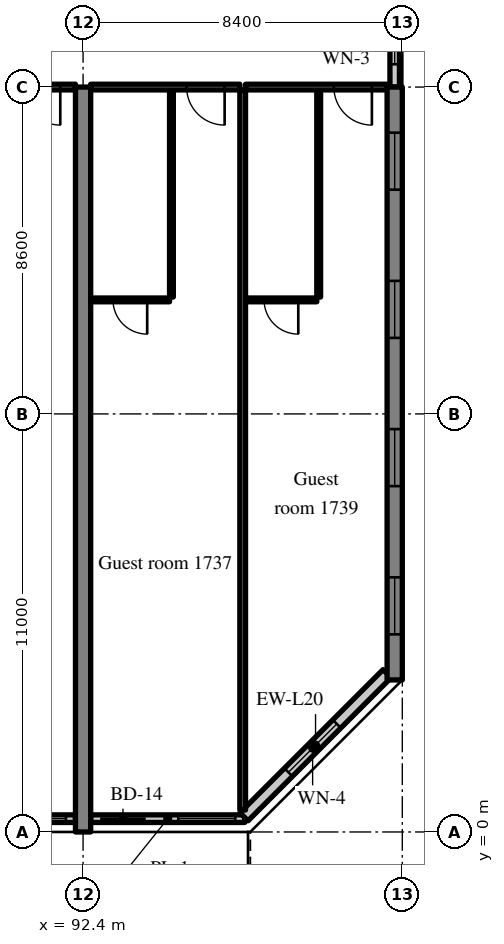
"""IFC4 building model, lengths in metres.
Left out: names, types, materials, properties, quantities, classifications, styles, units other than length and angle.
Written with IfcOpenShell. Run it as: python <this file> out.ifc"""

import sys

from ifc_helpers import new_model, si_unit, direction, frame, frame_2d, origin, place, context, subcontext, project, spatial, rectangle, extrude, source, transform, mapped, element, fill, save


model = new_model("IFC4")
c1 = context("Model", 3, precision=1e-05, world=origin(), true_north=direction((0.0, 1.0)))
c2 = subcontext(c1, "Body", "Model", "MODEL_VIEW")
j1 = project(units=[si_unit("LENGTHUNIT", "METRE"), si_unit("PLANEANGLEUNIT", "RADIAN")], contexts=[c1])
p1 = place(None, origin())
s1 = spatial("IfcSite", under=j1, at=p1, CompositionType="ELEMENT")
p2 = place(p1, origin())
s2 = spatial("IfcBuilding", under=s1, at=p2, CompositionType="ELEMENT")
p3 = place(p2, frame((0.0, 0.0, 73.4)))
s3 = spatial("IfcBuildingStorey", under=s2, at=p3, CompositionType="ELEMENT", Elevation=73.4)
m1 = source(origin(), c2, "Body", "SweptSolid", [
    extrude(rectangle(XDim=19.6, YDim=0.4, at=frame_2d((9.8, 0.0))), origin(), (0.0, 0.0, 1.0), 3.52),
])
p4 = place(p3, frame((92.4, 0.0, 0.0), z_axis=(0.0, 0.0, 1.0), x_axis=(0.0, 1.0, 0.0)))
e1 = element("IfcWall", 1, at=p4, inside=s3, PredefinedType="SHEAR", context=c2, shape_type="MappedRepresentation", body=[
    mapped(m1, transform((0.0, 0.0, 0.0), scale=1.0)),
])
m2 = source(origin(), c2, "Body", "SweptSolid", [
    extrude(rectangle(XDim=15.6, YDim=0.4, at=frame_2d((7.8, 0.0))), origin(), (0.0, 0.0, 1.0), 3.52),
])
p5 = place(p3, frame((100.6, 4.0, 0.0), z_axis=(0.0, 0.0, 1.0), x_axis=(0.0, 1.0, 0.0)))
e2 = element("IfcWall", 2, at=p5, inside=s3, PredefinedType="SHEAR", context=c2, shape_type="MappedRepresentation", body=[
    mapped(m2, transform((0.0, 0.0, 0.0), scale=1.0)),
])
m3 = source(origin(), c2, "Body", "SweptSolid", [
    extrude(rectangle(XDim=1.5, YDim=1.5, at=frame_2d((0.75, 0.75))), frame((0.0, 0.21, 0.0), z_axis=(0.0, -1.0, 0.0), x_axis=(1.0, 0.0, 0.0)), (0.0, 0.0, 1.0), 0.42),
])
p6 = place(p5, frame((1.2, 0.0, 0.9)))
e3 = element("IfcOpeningElement", 3, at=p6, cuts=e2, PredefinedType="OPENING", context=c2, shape_type="MappedRepresentation", body=[
    mapped(m3, transform((0.0, 0.0, 0.0), scale=1.0)),
])
p7 = place(p5, frame((5.1, 0.0, 0.9)))
e4 = element("IfcOpeningElement", 4, at=p7, cuts=e2, PredefinedType="OPENING", context=c2, shape_type="MappedRepresentation", body=[
    mapped(m3, transform((0.0, 0.0, 0.0), scale=1.0)),
])
p8 = place(p5, frame((9.0, 0.0, 0.9)))
e5 = element("IfcOpeningElement", 5, at=p8, cuts=e2, PredefinedType="OPENING", context=c2, shape_type="MappedRepresentation", body=[
    mapped(m3, transform((0.0, 0.0, 0.0), scale=1.0)),
])
p9 = place(p5, frame((12.9, 0.0, 0.9)))
e6 = element("IfcOpeningElement", 6, at=p9, cuts=e2, PredefinedType="OPENING", context=c2, shape_type="MappedRepresentation", body=[
    mapped(m3, transform((0.0, 0.0, 0.0), scale=1.0)),
])
m4 = source(origin(), c2, "Body", "SweptSolid", [
    extrude(rectangle(XDim=3.6, YDim=0.2, at=frame_2d((1.8, 0.0))), origin(), (0.0, 0.0, 1.0), 2.82),
])
p10 = place(p3, frame((88.6, 0.35, 0.0), z_axis=(0.0, 0.0, 1.0), x_axis=(1.0, 0.0, 0.0)))
e7 = element("IfcWall", 7, at=p10, inside=s3, PredefinedType="SOLIDWALL", context=c2, shape_type="MappedRepresentation", body=[
    mapped(m4, transform((0.0, 0.0, 0.0), scale=1.0)),
])
m5 = source(origin(), c2, "Body", "SweptSolid", [
    extrude(rectangle(XDim=1.2, YDim=2.4, at=frame_2d((0.6, 1.2))), frame((0.0, 0.11, 0.0), z_axis=(0.0, -1.0, 0.0), x_axis=(1.0, 0.0, 0.0)), (0.0, 0.0, 1.0), 0.22),
])
p11 = place(p10, frame((0.25, 0.0, 0.0)))
e8 = element("IfcOpeningElement", 8, at=p11, cuts=e7, PredefinedType="OPENING", context=c2, shape_type="MappedRepresentation", body=[
    mapped(m5, transform((0.0, 0.0, 0.0), scale=1.0)),
])
m6 = source(origin(), c2, "Body", "SweptSolid", [
    extrude(rectangle(XDim=1.5, YDim=1.5, at=frame_2d((0.75, 0.75))), frame((0.0, 0.11, 0.0), z_axis=(0.0, -1.0, 0.0), x_axis=(1.0, 0.0, 0.0)), (0.0, 0.0, 1.0), 0.22),
])
p12 = place(p10, frame((1.85, 0.0, 0.9)))
e9 = element("IfcOpeningElement", 9, at=p12, cuts=e7, PredefinedType="OPENING", context=c2, shape_type="MappedRepresentation", body=[
    mapped(m6, transform((0.0, 0.0, 0.0), scale=1.0)),
])
m7 = source(origin(), c2, "Body", "SweptSolid", [
    extrude(rectangle(XDim=4.055, YDim=0.2, at=frame_2d((2.027, 0.0))), origin(), (0.0, 0.0, 1.0), 2.82),
])
p13 = place(p3, frame((92.6, 0.35, 0.0), z_axis=(0.0, 0.0, 1.0), x_axis=(1.0, 0.0, 0.0)))
e10 = element("IfcWall", 10, at=p13, inside=s3, PredefinedType="SOLIDWALL", context=c2, shape_type="MappedRepresentation", body=[
    mapped(m7, transform((0.0, 0.0, 0.0), scale=1.0)),
])
p14 = place(p13, frame((0.25, 0.0, 0.0)))
e11 = element("IfcOpeningElement", 11, at=p14, cuts=e10, PredefinedType="OPENING", context=c2, shape_type="MappedRepresentation", body=[
    mapped(m5, transform((0.0, 0.0, 0.0), scale=1.0)),
])
p15 = place(p13, frame((2.305, 0.0, 0.9)))
e12 = element("IfcOpeningElement", 12, at=p15, cuts=e10, PredefinedType="OPENING", context=c2, shape_type="MappedRepresentation", body=[
    mapped(m6, transform((0.0, 0.0, 0.0), scale=1.0)),
])
m8 = source(origin(), c2, "Body", "SweptSolid", [
    extrude(rectangle(XDim=5.326, YDim=0.3, at=frame_2d((2.663, 0.0))), origin(), (0.0, 0.0, 1.0), 3.52),
])
p16 = place(p3, frame((96.634, 0.4, 0.0), z_axis=(0.0, 0.0, 1.0), x_axis=(0.707083859269, 0.707129702361, 0.0)))
e13 = element("IfcWall", 13, at=p16, inside=s3, PredefinedType="SOLIDWALL", context=c2, shape_type="MappedRepresentation", body=[
    mapped(m8, transform((0.0, 0.0, 0.0), scale=1.0)),
])
m9 = source(origin(), c2, "Body", "SweptSolid", [
    extrude(rectangle(XDim=1.8, YDim=1.5, at=frame_2d((0.9, 0.75))), frame((0.0, 0.16, 0.0), z_axis=(0.0, -1.0, 0.0), x_axis=(1.0, 0.0, 0.0)), (0.0, 0.0, 1.0), 0.32),
])
p17 = place(p16, frame((1.654, 0.0, 0.9)))
e14 = element("IfcOpeningElement", 14, at=p17, cuts=e13, PredefinedType="OPENING", context=c2, shape_type="MappedRepresentation", body=[
    mapped(m9, transform((0.0, 0.0, 0.0), scale=1.0)),
])
m10 = source(origin(), c2, "Body", "SweptSolid", [
    extrude(rectangle(XDim=2.4, YDim=0.25, at=frame_2d((1.2, 0.0))), origin(), (0.0, 0.0, 1.0), 2.62),
])
p18 = place(p3, frame((100.6, 19.6, 0.0), z_axis=(0.0, 0.0, 1.0), x_axis=(0.0, 1.0, 0.0)))
e15 = element("IfcWall", 15, at=p18, inside=s3, PredefinedType="SOLIDWALL", context=c2, shape_type="MappedRepresentation", body=[
    mapped(m10, transform((0.0, 0.0, 0.0), scale=1.0)),
])
m11 = source(origin(), c2, "Body", "SweptSolid", [
    extrude(rectangle(XDim=1.2, YDim=1.5, at=frame_2d((0.6, 0.75))), frame((0.0, 0.135, 0.0), z_axis=(0.0, -1.0, 0.0), x_axis=(1.0, 0.0, 0.0)), (0.0, 0.0, 1.0), 0.27),
])
p19 = place(p18, frame((0.6, 0.0, 0.9)))
e16 = element("IfcOpeningElement", 16, at=p19, cuts=e15, PredefinedType="OPENING", context=c2, shape_type="MappedRepresentation", body=[
    mapped(m11, transform((0.0, 0.0, 0.0), scale=1.0)),
])
m12 = source(origin(), c2, "Body", "SweptSolid", [
    extrude(rectangle(XDim=8.0, YDim=0.15, at=frame_2d((4.0, 0.0))), origin(), (0.0, 0.0, 1.0), 2.82),
])
p20 = place(p3, frame((84.2, 19.6, 0.0), z_axis=(0.0, 0.0, 1.0), x_axis=(1.0, 0.0, 0.0)))
e17 = element("IfcWall", 17, at=p20, inside=s3, PredefinedType="PARTITIONING", context=c2, shape_type="MappedRepresentation", body=[
    mapped(m12, transform((0.0, 0.0, 0.0), scale=1.0)),
])
m13 = source(origin(), c2, "Body", "SweptSolid", [
    extrude(rectangle(XDim=1.0, YDim=2.1, at=frame_2d((0.5, 1.05))), frame((0.0, 0.085, 0.0), z_axis=(0.0, -1.0, 0.0), x_axis=(1.0, 0.0, 0.0)), (0.0, 0.0, 1.0), 0.17),
])
p21 = place(p20, frame((6.6, 0.0, 0.0)))
e18 = element("IfcOpeningElement", 18, at=p21, cuts=e17, PredefinedType="OPENING", context=c2, shape_type="MappedRepresentation", body=[
    mapped(m13, transform((0.0, 0.0, 0.0), scale=1.0)),
])
m14 = source(origin(), c2, "Body", "SweptSolid", [
    extrude(rectangle(XDim=5.45, YDim=0.1, at=frame_2d((2.725, 0.0))), origin(), (0.0, 0.0, 1.0), 3.52),
])
p22 = place(p3, frame((94.725, 14.075, 0.0), z_axis=(0.0, 0.0, 1.0), x_axis=(0.0, 1.0, 0.0)))
e19 = element("IfcWall", 19, at=p22, inside=s3, PredefinedType="PARTITIONING", context=c2, shape_type="MappedRepresentation", body=[
    mapped(m14, transform((0.0, 0.0, 0.0), scale=1.0)),
])
m15 = source(origin(), c2, "Body", "SweptSolid", [
    extrude(rectangle(XDim=2.075, YDim=0.1, at=frame_2d((1.038, 0.0))), origin(), (0.0, 0.0, 1.0), 3.52),
])
p23 = place(p3, frame((92.6, 14.0, 0.0), z_axis=(0.0, 0.0, 1.0), x_axis=(1.0, 0.0, 0.0)))
e20 = element("IfcWall", 20, at=p23, inside=s3, PredefinedType="PARTITIONING", context=c2, shape_type="MappedRepresentation", body=[
    mapped(m15, transform((0.0, 0.0, 0.0), scale=1.0)),
])
m16 = source(origin(), c2, "Body", "SweptSolid", [
    extrude(rectangle(XDim=0.9, YDim=2.1, at=frame_2d((0.45, 1.05))), frame((0.0, 0.06, 0.0), z_axis=(0.0, -1.0, 0.0), x_axis=(1.0, 0.0, 0.0)), (0.0, 0.0, 1.0), 0.12),
])
p24 = place(p23, frame((0.587, 0.0, 0.0)))
e21 = element("IfcOpeningElement", 21, at=p24, cuts=e20, PredefinedType="OPENING", context=c2, shape_type="MappedRepresentation", body=[
    mapped(m16, transform((0.0, 0.0, 0.0), scale=1.0)),
])
m17 = source(origin(), c2, "Body", "SweptSolid", [
    extrude(rectangle(XDim=3.925, YDim=0.15, at=frame_2d((1.962, 0.0))), origin(), (0.0, 0.0, 1.0), 2.82),
])
p25 = place(p3, frame((92.6, 19.6, 0.0), z_axis=(0.0, 0.0, 1.0), x_axis=(1.0, 0.0, 0.0)))
e22 = element("IfcWall", 22, at=p25, inside=s3, PredefinedType="PARTITIONING", context=c2, shape_type="MappedRepresentation", body=[
    mapped(m17, transform((0.0, 0.0, 0.0), scale=1.0)),
])
p26 = place(p25, frame((2.525, 0.0, 0.0)))
e23 = element("IfcOpeningElement", 23, at=p26, cuts=e22, PredefinedType="OPENING", context=c2, shape_type="MappedRepresentation", body=[
    mapped(m13, transform((0.0, 0.0, 0.0), scale=1.0)),
])
p27 = place(p3, frame((98.6, 14.075, 0.0), z_axis=(0.0, 0.0, 1.0), x_axis=(0.0, 1.0, 0.0)))
e24 = element("IfcWall", 24, at=p27, inside=s3, PredefinedType="PARTITIONING", context=c2, shape_type="MappedRepresentation", body=[
    mapped(m14, transform((0.0, 0.0, 0.0), scale=1.0)),
])
m18 = source(origin(), c2, "Body", "SweptSolid", [
    extrude(rectangle(XDim=1.875, YDim=0.1, at=frame_2d((0.938, 0.0))), origin(), (0.0, 0.0, 1.0), 3.52),
])
p28 = place(p3, frame((96.675, 14.0, 0.0), z_axis=(0.0, 0.0, 1.0), x_axis=(1.0, 0.0, 0.0)))
e25 = element("IfcWall", 25, at=p28, inside=s3, PredefinedType="PARTITIONING", context=c2, shape_type="MappedRepresentation", body=[
    mapped(m18, transform((0.0, 0.0, 0.0), scale=1.0)),
])
p29 = place(p28, frame((0.488, 0.0, 0.0)))
e26 = element("IfcOpeningElement", 26, at=p29, cuts=e25, PredefinedType="OPENING", context=c2, shape_type="MappedRepresentation", body=[
    mapped(m16, transform((0.0, 0.0, 0.0), scale=1.0)),
])
m19 = source(origin(), c2, "Body", "SweptSolid", [
    extrude(rectangle(XDim=3.725, YDim=0.15, at=frame_2d((1.862, 0.0))), origin(), (0.0, 0.0, 1.0), 2.82),
])
p30 = place(p3, frame((96.675, 19.6, 0.0), z_axis=(0.0, 0.0, 1.0), x_axis=(1.0, 0.0, 0.0)))
e27 = element("IfcWall", 27, at=p30, inside=s3, PredefinedType="PARTITIONING", context=c2, shape_type="MappedRepresentation", body=[
    mapped(m19, transform((0.0, 0.0, 0.0), scale=1.0)),
])
p31 = place(p30, frame((2.325, 0.0, 0.0)))
e28 = element("IfcOpeningElement", 28, at=p31, cuts=e27, PredefinedType="OPENING", context=c2, shape_type="MappedRepresentation", body=[
    mapped(m13, transform((0.0, 0.0, 0.0), scale=1.0)),
])
m20 = source(origin(), c2, "Body", "SweptSolid", [
    extrude(rectangle(XDim=18.947, YDim=0.15, at=frame_2d((9.474, 0.0))), origin(), (0.0, 0.0, 1.0), 3.52),
])
p32 = place(p3, frame((96.6, 0.578, 0.0), z_axis=(0.0, 0.0, 1.0), x_axis=(0.0, 1.0, 0.0)))
e29 = element("IfcWall", 29, at=p32, inside=s3, PredefinedType="PARTITIONING", context=c2, shape_type="MappedRepresentation", body=[
    mapped(m20, transform((0.0, 0.0, 0.0), scale=1.0)),
])
m21 = source(origin(), c2, "Body", "SweptSolid", [
    extrude(rectangle(XDim=1.5, YDim=1.5, at=frame_2d((0.75, 0.75))), frame((0.0, 0.03, 0.0), z_axis=(0.0, -1.0, 0.0), x_axis=(1.0, 0.0, 0.0)), (0.0, 0.0, 1.0), 0.06),
])
p33 = place(p12, origin())
e30 = element("IfcWindow", 30, at=p33, inside=s3, PartitioningType="SINGLE_PANEL", PredefinedType="WINDOW", context=c2, shape_type="MappedRepresentation", body=[
    mapped(m21, transform((0.0, 0.0, 0.0), scale=1.0)),
])
fill(e9, e30)
m22 = source(origin(), c2, "Body", "SweptSolid", [
    extrude(rectangle(XDim=1.2, YDim=2.4, at=frame_2d((0.6, 1.2))), frame((0.0, 0.025, 0.0), z_axis=(0.0, -1.0, 0.0), x_axis=(1.0, 0.0, 0.0)), (0.0, 0.0, 1.0), 0.05),
])
p34 = place(p14, origin())
e31 = element("IfcDoor", 31, at=p34, inside=s3, OperationType="SLIDING_TO_RIGHT", PredefinedType="DOOR", context=c2, shape_type="MappedRepresentation", body=[
    mapped(m22, transform((0.0, 0.0, 0.0), scale=1.0)),
])
fill(e11, e31)
p35 = place(p15, origin())
e32 = element("IfcWindow", 32, at=p35, inside=s3, PartitioningType="SINGLE_PANEL", PredefinedType="WINDOW", context=c2, shape_type="MappedRepresentation", body=[
    mapped(m21, transform((0.0, 0.0, 0.0), scale=1.0)),
])
fill(e12, e32)
m23 = source(origin(), c2, "Body", "SweptSolid", [
    extrude(rectangle(XDim=1.8, YDim=1.5, at=frame_2d((0.9, 0.75))), frame((0.0, 0.03, 0.0), z_axis=(0.0, -1.0, 0.0), x_axis=(1.0, 0.0, 0.0)), (0.0, 0.0, 1.0), 0.06),
])
p36 = place(p17, origin())
e33 = element("IfcWindow", 33, at=p36, inside=s3, PartitioningType="SINGLE_PANEL", PredefinedType="WINDOW", context=c2, shape_type="MappedRepresentation", body=[
    mapped(m23, transform((0.0, 0.0, 0.0), scale=1.0)),
])
fill(e14, e33)
p37 = place(p6, origin())
e34 = element("IfcWindow", 34, at=p37, inside=s3, PartitioningType="SINGLE_PANEL", PredefinedType="WINDOW", context=c2, shape_type="MappedRepresentation", body=[
    mapped(m21, transform((0.0, 0.0, 0.0), scale=1.0)),
])
fill(e3, e34)
p38 = place(p7, origin())
e35 = element("IfcWindow", 35, at=p38, inside=s3, PartitioningType="SINGLE_PANEL", PredefinedType="WINDOW", context=c2, shape_type="MappedRepresentation", body=[
    mapped(m21, transform((0.0, 0.0, 0.0), scale=1.0)),
])
fill(e4, e35)
p39 = place(p8, origin())
e36 = element("IfcWindow", 36, at=p39, inside=s3, PartitioningType="SINGLE_PANEL", PredefinedType="WINDOW", context=c2, shape_type="MappedRepresentation", body=[
    mapped(m21, transform((0.0, 0.0, 0.0), scale=1.0)),
])
fill(e5, e36)
p40 = place(p9, origin())
e37 = element("IfcWindow", 37, at=p40, inside=s3, PartitioningType="SINGLE_PANEL", PredefinedType="WINDOW", context=c2, shape_type="MappedRepresentation", body=[
    mapped(m21, transform((0.0, 0.0, 0.0), scale=1.0)),
])
fill(e6, e37)
m24 = source(origin(), c2, "Body", "SweptSolid", [
    extrude(rectangle(XDim=1.2, YDim=1.5, at=frame_2d((0.6, 0.75))), frame((0.0, 0.03, 0.0), z_axis=(0.0, -1.0, 0.0), x_axis=(1.0, 0.0, 0.0)), (0.0, 0.0, 1.0), 0.06),
])
p41 = place(p19, origin())
e38 = element("IfcWindow", 38, at=p41, inside=s3, PartitioningType="SINGLE_PANEL", PredefinedType="WINDOW", context=c2, shape_type="MappedRepresentation", body=[
    mapped(m24, transform((0.0, 0.0, 0.0), scale=1.0)),
])
fill(e16, e38)
m25 = source(origin(), c2, "Body", "SweptSolid", [
    extrude(rectangle(XDim=1.0, YDim=2.1, at=frame_2d((0.5, 1.05))), frame((0.0, 0.025, 0.0), z_axis=(0.0, -1.0, 0.0), x_axis=(1.0, 0.0, 0.0)), (0.0, 0.0, 1.0), 0.05),
])
p42 = place(p21, origin())
e39 = element("IfcDoor", 39, at=p42, inside=s3, OperationType="SINGLE_SWING_RIGHT", PredefinedType="DOOR", context=c2, shape_type="MappedRepresentation", body=[
    mapped(m25, transform((0.0, 0.0, 0.0), scale=1.0)),
])
fill(e18, e39)
m26 = source(origin(), c2, "Body", "SweptSolid", [
    extrude(rectangle(XDim=0.9, YDim=2.1, at=frame_2d((0.45, 1.05))), frame((0.0, 0.025, 0.0), z_axis=(0.0, -1.0, 0.0), x_axis=(1.0, 0.0, 0.0)), (0.0, 0.0, 1.0), 0.05),
])
p43 = place(p24, origin())
e40 = element("IfcDoor", 40, at=p43, inside=s3, OperationType="SINGLE_SWING_RIGHT", PredefinedType="DOOR", context=c2, shape_type="MappedRepresentation", body=[
    mapped(m26, transform((0.0, 0.0, 0.0), scale=1.0)),
])
fill(e21, e40)
p44 = place(p26, origin())
e41 = element("IfcDoor", 41, at=p44, inside=s3, OperationType="SINGLE_SWING_RIGHT", PredefinedType="DOOR", context=c2, shape_type="MappedRepresentation", body=[
    mapped(m25, transform((0.0, 0.0, 0.0), scale=1.0)),
])
fill(e23, e41)
p45 = place(p29, origin())
e42 = element("IfcDoor", 42, at=p45, inside=s3, OperationType="SINGLE_SWING_RIGHT", PredefinedType="DOOR", context=c2, shape_type="MappedRepresentation", body=[
    mapped(m26, transform((0.0, 0.0, 0.0), scale=1.0)),
])
fill(e26, e42)
p46 = place(p31, origin())
e43 = element("IfcDoor", 43, at=p46, inside=s3, OperationType="SINGLE_SWING_RIGHT", PredefinedType="DOOR", context=c2, shape_type="MappedRepresentation", body=[
    mapped(m25, transform((0.0, 0.0, 0.0), scale=1.0)),
])
fill(e28, e43)
save(model, sys.argv[1])
